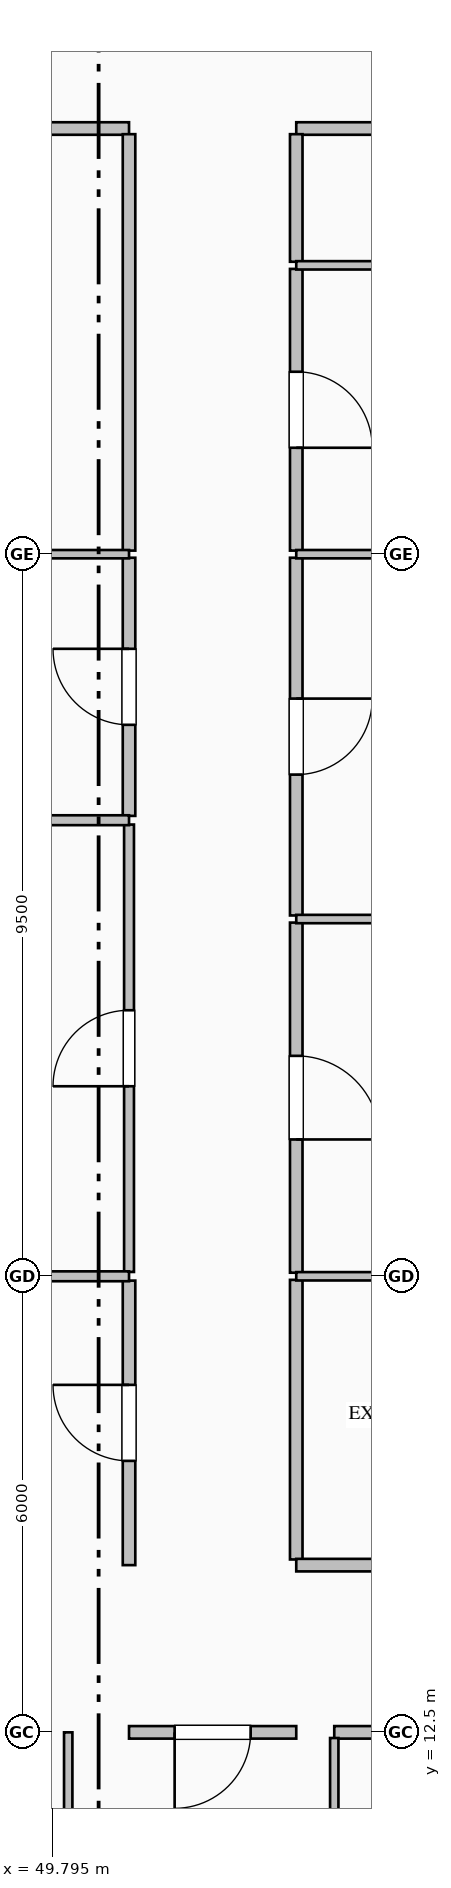
"""IFC4 building model, lengths in metres.
Left out: names, types, materials, properties, quantities, classifications, styles, units other than length and angle.
Written with IfcOpenShell. Run it as: python <this file> out.ifc"""

import sys

from ifc_helpers import new_model, si_unit, direction, frame, frame_2d, origin, place, context, subcontext, project, spatial, rectangle, extrude, element, fill, save


model = new_model("IFC4")
c1 = context("Model", 3, precision=1e-05, world=origin(), true_north=direction((0.0, 1.0)))
c2 = subcontext(c1, "Body", "Model", "MODEL_VIEW")
j1 = project(units=[si_unit("LENGTHUNIT", "METRE"), si_unit("PLANEANGLEUNIT", "RADIAN")], contexts=[c1])
p1 = place(None, origin())
s1 = spatial("IfcSite", under=j1, at=p1, CompositionType="ELEMENT")
p2 = place(p1, origin())
s2 = spatial("IfcBuilding", under=s1, at=p2, CompositionType="ELEMENT")
p3 = place(p2, frame((0.0, 0.0, 123.0)))
s3 = spatial("IfcBuildingStorey", under=s2, at=p3, CompositionType="ELEMENT", Elevation=123.0)
p4 = place(p3, frame((56.5, 33.6, 0.0), z_axis=(0.0, 0.0, 1.0), x_axis=(-1.0, 0.0, 0.0)))
e1 = element("IfcWall", 1, at=p4, inside=s3, PredefinedType="PARTITIONING", context=c2, shape_type="SweptSolid", body=[
    extrude(rectangle(XDim=3.5, YDim=0.165, at=frame_2d((1.75, 0.0))), origin(), (0.0, 0.0, 1.0), 3.765),
])
p5 = place(p4, frame((1.2, 0.0, 0.0)))
e2 = element("IfcOpeningElement", 2, at=p5, cuts=e1, PredefinedType="OPENING", context=c2, shape_type="SweptSolid", body=[
    extrude(rectangle(XDim=1.1, YDim=2.2, at=frame_2d((0.55, 1.1))), frame((0.0, 0.093, 0.0), z_axis=(0.0, -1.0, 0.0), x_axis=(1.0, 0.0, 0.0)), (0.0, 0.0, 1.0), 0.185),
])
p6 = place(p3, frame((50.8, 33.6, 0.0), z_axis=(0.0, 0.0, 1.0), x_axis=(-1.0, 0.0, 0.0)))
e3 = element("IfcWall", 3, at=p6, inside=s3, PredefinedType="PARTITIONING", context=c2, shape_type="SweptSolid", body=[
    extrude(rectangle(XDim=10.3, YDim=0.165, at=frame_2d((5.15, 0.0))), origin(), (0.0, 0.0, 1.0), 3.765),
])
p7 = place(p6, frame((4.65, 0.0, 0.0)))
e4 = element("IfcOpeningElement", 4, at=p7, cuts=e3, PredefinedType="OPENING", context=c2, shape_type="SweptSolid", body=[
    extrude(rectangle(XDim=1.0, YDim=2.15, at=frame_2d((0.5, 1.075))), frame((0.0, 0.093, 0.0), z_axis=(0.0, -1.0, 0.0), x_axis=(1.0, 0.0, 0.0)), (0.0, 0.0, 1.0), 0.185),
])
p8 = place(p3, frame((53.0, 18.453, 0.0), z_axis=(0.0, 0.0, 1.0), x_axis=(0.0, -1.0, 0.0)))
e5 = element("IfcWall", 5, at=p8, inside=s3, PredefinedType="PARTITIONING", context=c2, shape_type="SweptSolid", body=[
    extrude(rectangle(XDim=3.678, YDim=0.165, at=frame_2d((1.839, 0.0))), origin(), (0.0, 0.0, 1.0), 3.765),
])
p9 = place(p3, frame((53.0, 23.153, 0.0), z_axis=(0.0, 0.0, 1.0), x_axis=(0.0, -1.0, 0.0)))
e6 = element("IfcWall", 6, at=p9, inside=s3, PredefinedType="PARTITIONING", context=c2, shape_type="SweptSolid", body=[
    extrude(rectangle(XDim=4.606, YDim=0.165, at=frame_2d((2.303, 0.0))), origin(), (0.0, 0.0, 1.0), 3.765),
])
p10 = place(p9, frame((1.753, 0.0, 0.0)))
e7 = element("IfcOpeningElement", 7, at=p10, cuts=e6, PredefinedType="OPENING", context=c2, shape_type="SweptSolid", body=[
    extrude(rectangle(XDim=1.1, YDim=2.2, at=frame_2d((0.55, 1.1))), frame((0.0, 0.093, 0.0), z_axis=(0.0, -1.0, 0.0), x_axis=(1.0, 0.0, 0.0)), (0.0, 0.0, 1.0), 0.185),
])
p11 = place(p3, frame((53.0, 27.953, 0.0), z_axis=(0.0, 0.0, 1.0), x_axis=(0.0, -1.0, 0.0)))
e8 = element("IfcWall", 8, at=p11, inside=s3, PredefinedType="PARTITIONING", context=c2, shape_type="SweptSolid", body=[
    extrude(rectangle(XDim=4.706, YDim=0.165, at=frame_2d((2.353, 0.0))), origin(), (0.0, 0.0, 1.0), 3.765),
])
p12 = place(p11, frame((1.853, 0.0, 0.0)))
e9 = element("IfcOpeningElement", 9, at=p12, cuts=e8, PredefinedType="OPENING", context=c2, shape_type="SweptSolid", body=[
    extrude(rectangle(XDim=1.0, YDim=2.15, at=frame_2d((0.5, 1.075))), frame((0.0, 0.093, 0.0), z_axis=(0.0, -1.0, 0.0), x_axis=(1.0, 0.0, 0.0)), (0.0, 0.0, 1.0), 0.185),
])
p13 = place(p3, frame((53.0, 31.753, 0.0), z_axis=(0.0, 0.0, 1.0), x_axis=(0.0, -1.0, 0.0)))
e10 = element("IfcWall", 10, at=p13, inside=s3, PredefinedType="PARTITIONING", context=c2, shape_type="SweptSolid", body=[
    extrude(rectangle(XDim=3.706, YDim=0.165, at=frame_2d((1.853, 0.0))), origin(), (0.0, 0.0, 1.0), 3.765),
])
p14 = place(p13, frame((1.353, 0.0, 0.0)))
e11 = element("IfcOpeningElement", 11, at=p14, cuts=e10, PredefinedType="OPENING", context=c2, shape_type="SweptSolid", body=[
    extrude(rectangle(XDim=1.0, YDim=2.15, at=frame_2d((0.5, 1.075))), frame((0.0, 0.093, 0.0), z_axis=(0.0, -1.0, 0.0), x_axis=(1.0, 0.0, 0.0)), (0.0, 0.0, 1.0), 0.185),
])
p15 = place(p3, frame((53.0, 33.525, 0.0), z_axis=(0.0, 0.0, 1.0), x_axis=(0.0, -1.0, 0.0)))
e12 = element("IfcWall", 12, at=p15, inside=s3, PredefinedType="PARTITIONING", context=c2, shape_type="SweptSolid", body=[
    extrude(rectangle(XDim=1.678, YDim=0.165, at=frame_2d((0.839, 0.0))), origin(), (0.0, 0.0, 1.0), 3.765),
])
p16 = place(p3, frame((50.8, 14.7, 0.0), z_axis=(0.0, 0.0, 1.0), x_axis=(0.0, 1.0, 0.0)))
e13 = element("IfcWall", 13, at=p16, inside=s3, PredefinedType="PARTITIONING", context=c2, shape_type="SweptSolid", body=[
    extrude(rectangle(XDim=3.743, YDim=0.165, at=frame_2d((1.872, 0.0))), origin(), (0.0, 0.0, 1.0), 3.765),
])
p17 = place(p16, frame((1.372, 0.0, 0.0)))
e14 = element("IfcOpeningElement", 14, at=p17, cuts=e13, PredefinedType="OPENING", context=c2, shape_type="SweptSolid", body=[
    extrude(rectangle(XDim=1.0, YDim=2.15, at=frame_2d((0.5, 1.075))), frame((0.0, 0.093, 0.0), z_axis=(0.0, -1.0, 0.0), x_axis=(1.0, 0.0, 0.0)), (0.0, 0.0, 1.0), 0.185),
])
p18 = place(p3, frame((50.8, 18.557, 0.0), z_axis=(0.0, 0.0, 1.0), x_axis=(0.0, 1.0, 0.0)))
e15 = element("IfcWall", 15, at=p18, inside=s3, PredefinedType="PARTITIONING", context=c2, shape_type="SweptSolid", body=[
    extrude(rectangle(XDim=5.886, YDim=0.13, at=frame_2d((2.943, 0.0))), origin(), (0.0, 0.0, 1.0), 3.765),
])
p19 = place(p18, frame((2.443, 0.0, 0.0)))
e16 = element("IfcOpeningElement", 16, at=p19, cuts=e15, PredefinedType="OPENING", context=c2, shape_type="SweptSolid", body=[
    extrude(rectangle(XDim=1.0, YDim=2.15, at=frame_2d((0.5, 1.075))), frame((0.0, 0.075, 0.0), z_axis=(0.0, -1.0, 0.0), x_axis=(1.0, 0.0, 0.0)), (0.0, 0.0, 1.0), 0.15),
])
p20 = place(p3, frame((50.8, 24.557, 0.0), z_axis=(0.0, 0.0, 1.0), x_axis=(0.0, 1.0, 0.0)))
e17 = element("IfcWall", 17, at=p20, inside=s3, PredefinedType="PARTITIONING", context=c2, shape_type="SweptSolid", body=[
    extrude(rectangle(XDim=3.396, YDim=0.165, at=frame_2d((1.698, 0.0))), origin(), (0.0, 0.0, 1.0), 3.765),
])
p21 = place(p20, frame((1.198, 0.0, 0.0)))
e18 = element("IfcOpeningElement", 18, at=p21, cuts=e17, PredefinedType="OPENING", context=c2, shape_type="SweptSolid", body=[
    extrude(rectangle(XDim=1.0, YDim=2.15, at=frame_2d((0.5, 1.075))), frame((0.0, 0.093, 0.0), z_axis=(0.0, -1.0, 0.0), x_axis=(1.0, 0.0, 0.0)), (0.0, 0.0, 1.0), 0.185),
])
p22 = place(p3, frame((50.8, 28.047, 0.0), z_axis=(0.0, 0.0, 1.0), x_axis=(0.0, 1.0, 0.0)))
e19 = element("IfcWall", 19, at=p22, inside=s3, PredefinedType="PARTITIONING", context=c2, shape_type="SweptSolid", body=[
    extrude(rectangle(XDim=5.478, YDim=0.165, at=frame_2d((2.739, 0.0))), origin(), (0.0, 0.0, 1.0), 3.765),
])
p23 = place(p3, frame((53.0, 12.5, 0.0), z_axis=(0.0, 0.0, 1.0), x_axis=(-1.0, 0.0, 0.0)))
e20 = element("IfcWall", 20, at=p23, inside=s3, PredefinedType="PARTITIONING", context=c2, shape_type="SweptSolid", body=[
    extrude(rectangle(XDim=2.2, YDim=0.165, at=frame_2d((1.1, 0.0))), origin(), (0.0, 0.0, 1.0), 3.157),
])
p24 = place(p23, frame((0.6, 0.0, 0.0)))
e21 = element("IfcOpeningElement", 21, at=p24, cuts=e20, PredefinedType="OPENING", context=c2, shape_type="SweptSolid", body=[
    extrude(rectangle(XDim=1.0, YDim=2.15, at=frame_2d((0.5, 1.075))), frame((0.0, 0.093, 0.0), z_axis=(0.0, -1.0, 0.0), x_axis=(1.0, 0.0, 0.0)), (0.0, 0.0, 1.0), 0.185),
])
p25 = place(p3, frame((53.0, 14.7, 0.0), z_axis=(0.0, 0.0, 1.0), x_axis=(1.0, 0.0, 0.0)))
e22 = element("IfcWall", 22, at=p25, inside=s3, PredefinedType="PARTITIONING", context=c2, shape_type="SweptSolid", body=[
    extrude(rectangle(XDim=8.5, YDim=0.165, at=frame_2d((4.25, 0.0))), origin(), (0.0, 0.0, 1.0), 3.765),
])
p26 = place(p25, frame((3.75, 0.0, 0.0)))
e23 = element("IfcOpeningElement", 23, at=p26, cuts=e22, PredefinedType="OPENING", context=c2, shape_type="SweptSolid", body=[
    extrude(rectangle(XDim=1.0, YDim=2.15, at=frame_2d((0.5, 1.075))), frame((0.0, 0.093, 0.0), z_axis=(0.0, -1.0, 0.0), x_axis=(1.0, 0.0, 0.0)), (0.0, 0.0, 1.0), 0.185),
])
p27 = place(p3, frame((57.0, 12.5, 0.0), z_axis=(0.0, 0.0, 1.0), x_axis=(-1.0, 0.0, 0.0)))
e24 = element("IfcWall", 24, at=p27, inside=s3, PredefinedType="PARTITIONING", context=c2, shape_type="SweptSolid", body=[
    extrude(rectangle(XDim=3.5, YDim=0.165, at=frame_2d((1.75, 0.0))), origin(), (0.0, 0.0, 1.0), 3.157),
])
p28 = place(p27, frame((1.2, 0.0, 0.0)))
e25 = element("IfcOpeningElement", 25, at=p28, cuts=e24, PredefinedType="OPENING", context=c2, shape_type="SweptSolid", body=[
    extrude(rectangle(XDim=1.1, YDim=2.2, at=frame_2d((0.55, 1.1))), frame((0.0, 0.093, 0.0), z_axis=(0.0, -1.0, 0.0), x_axis=(1.0, 0.0, 0.0)), (0.0, 0.0, 1.0), 0.185),
])
p29 = place(p3, frame((53.0, 18.5, 0.0), z_axis=(0.0, 0.0, 1.0), x_axis=(1.0, 0.0, 0.0)))
e26 = element("IfcWall", 26, at=p29, inside=s3, PredefinedType="MOVABLE", context=c2, shape_type="SweptSolid", body=[
    extrude(rectangle(XDim=10.728, YDim=0.11, at=frame_2d((5.364, 0.0))), origin(), (0.0, 0.0, 1.0), 3.157),
])
p30 = place(p3, frame((53.0, 23.2, 0.0), z_axis=(0.0, 0.0, 1.0), x_axis=(1.0, 0.0, 0.0)))
e27 = element("IfcWall", 27, at=p30, inside=s3, PredefinedType="MOVABLE", context=c2, shape_type="SweptSolid", body=[
    extrude(rectangle(XDim=10.728, YDim=0.11, at=frame_2d((5.364, 0.0))), origin(), (0.0, 0.0, 1.0), 3.407),
])
p31 = place(p3, frame((53.0, 28.0, 0.0), z_axis=(0.0, 0.0, 1.0), x_axis=(1.0, 0.0, 0.0)))
e28 = element("IfcWall", 28, at=p31, inside=s3, PredefinedType="MOVABLE", context=c2, shape_type="SweptSolid", body=[
    extrude(rectangle(XDim=10.728, YDim=0.11, at=frame_2d((5.364, 0.0))), origin(), (0.0, 0.0, 1.0), 3.157),
])
p32 = place(p3, frame((53.0, 31.8, 0.0), z_axis=(0.0, 0.0, 1.0), x_axis=(1.0, 0.0, 0.0)))
e29 = element("IfcWall", 29, at=p32, inside=s3, PredefinedType="MOVABLE", context=c2, shape_type="SweptSolid", body=[
    extrude(rectangle(XDim=10.728, YDim=0.11, at=frame_2d((5.364, 0.0))), origin(), (0.0, 0.0, 1.0), 3.765),
])
p33 = place(p3, frame((40.832, 18.5, 0.0), z_axis=(0.0, 0.0, 1.0), x_axis=(1.0, 0.0, 0.0)))
e30 = element("IfcWall", 30, at=p33, inside=s3, PredefinedType="PARTITIONING", context=c2, shape_type="SweptSolid", body=[
    extrude(rectangle(XDim=9.968, YDim=0.13, at=frame_2d((4.984, 0.0))), origin(), (0.0, 0.0, 1.0), 3.157),
])
p34 = place(p3, frame((40.832, 24.5, 0.0), z_axis=(0.0, 0.0, 1.0), x_axis=(1.0, 0.0, 0.0)))
e31 = element("IfcWall", 31, at=p34, inside=s3, PredefinedType="PARTITIONING", context=c2, shape_type="SweptSolid", body=[
    extrude(rectangle(XDim=9.968, YDim=0.13, at=frame_2d((4.984, 0.0))), origin(), (0.0, 0.0, 1.0), 3.765),
])
p35 = place(p3, frame((40.832, 28.0, 0.0), z_axis=(0.0, 0.0, 1.0), x_axis=(1.0, 0.0, 0.0)))
e32 = element("IfcWall", 32, at=p35, inside=s3, PredefinedType="MOVABLE", context=c2, shape_type="SweptSolid", body=[
    extrude(rectangle(XDim=9.968, YDim=0.11, at=frame_2d((4.984, 0.0))), origin(), (0.0, 0.0, 1.0), 3.157),
])
p36 = place(p3, frame((50.0, 12.5, 0.0), z_axis=(0.0, 0.0, 1.0), x_axis=(0.0, -1.0, 0.0)))
e33 = element("IfcWall", 33, at=p36, inside=s3, PredefinedType="MOVABLE", context=c2, shape_type="SweptSolid", body=[
    extrude(rectangle(XDim=8.168, YDim=0.11, at=frame_2d((4.084, 0.0))), origin(), (0.0, 0.0, 1.0), 3.765),
])
p37 = place(p36, frame((3.534, 0.0, 0.0)))
e34 = element("IfcOpeningElement", 34, at=p37, cuts=e33, PredefinedType="OPENING", context=c2, shape_type="SweptSolid", body=[
    extrude(rectangle(XDim=1.1, YDim=2.2, at=frame_2d((0.55, 1.1))), frame((0.0, 0.065, 0.0), z_axis=(0.0, -1.0, 0.0), x_axis=(1.0, 0.0, 0.0)), (0.0, 0.0, 1.0), 0.13),
])
p38 = place(p3, frame((53.5, 12.426, 0.0), z_axis=(0.0, 0.0, 1.0), x_axis=(0.0, -1.0, 0.0)))
e35 = element("IfcWall", 35, at=p38, inside=s3, PredefinedType="MOVABLE", context=c2, shape_type="SweptSolid", body=[
    extrude(rectangle(XDim=8.094, YDim=0.11, at=frame_2d((4.047, 0.0))), origin(), (0.0, 0.0, 1.0), 3.765),
])
p39 = place(p10, origin())
e36 = element("IfcDoor", 36, at=p39, inside=s3, OperationType="SINGLE_SWING_RIGHT", PredefinedType="DOOR", context=c2, shape_type="SweptSolid", body=[
    extrude(rectangle(XDim=1.1, YDim=2.2, at=frame_2d((0.55, 1.1))), frame((0.0, 0.025, 0.0), z_axis=(0.0, -1.0, 0.0), x_axis=(1.0, 0.0, 0.0)), (0.0, 0.0, 1.0), 0.05),
])
fill(e7, e36)
p40 = place(p12, origin())
e37 = element("IfcDoor", 37, at=p40, inside=s3, OperationType="SINGLE_SWING_LEFT", PredefinedType="DOOR", context=c2, shape_type="SweptSolid", body=[
    extrude(rectangle(XDim=1.0, YDim=2.15, at=frame_2d((0.5, 1.075))), frame((0.0, 0.025, 0.0), z_axis=(0.0, -1.0, 0.0), x_axis=(1.0, 0.0, 0.0)), (0.0, 0.0, 1.0), 0.05),
])
fill(e9, e37)
p41 = place(p14, origin())
e38 = element("IfcDoor", 38, at=p41, inside=s3, OperationType="SINGLE_SWING_RIGHT", PredefinedType="DOOR", context=c2, shape_type="SweptSolid", body=[
    extrude(rectangle(XDim=1.0, YDim=2.15, at=frame_2d((0.5, 1.075))), frame((0.0, 0.025, 0.0), z_axis=(0.0, -1.0, 0.0), x_axis=(1.0, 0.0, 0.0)), (0.0, 0.0, 1.0), 0.05),
])
fill(e11, e38)
p42 = place(p17, origin())
e39 = element("IfcDoor", 39, at=p42, inside=s3, OperationType="SINGLE_SWING_RIGHT", PredefinedType="DOOR", context=c2, shape_type="SweptSolid", body=[
    extrude(rectangle(XDim=1.0, YDim=2.15, at=frame_2d((0.5, 1.075))), frame((0.0, 0.025, 0.0), z_axis=(0.0, -1.0, 0.0), x_axis=(1.0, 0.0, 0.0)), (0.0, 0.0, 1.0), 0.05),
])
fill(e14, e39)
p43 = place(p19, origin())
e40 = element("IfcDoor", 40, at=p43, inside=s3, OperationType="SINGLE_SWING_LEFT", PredefinedType="DOOR", context=c2, shape_type="SweptSolid", body=[
    extrude(rectangle(XDim=1.0, YDim=2.15, at=frame_2d((0.5, 1.075))), frame((0.0, 0.025, 0.0), z_axis=(0.0, -1.0, 0.0), x_axis=(1.0, 0.0, 0.0)), (0.0, 0.0, 1.0), 0.05),
])
fill(e16, e40)
p44 = place(p21, origin())
e41 = element("IfcDoor", 41, at=p44, inside=s3, OperationType="SINGLE_SWING_RIGHT", PredefinedType="DOOR", context=c2, shape_type="SweptSolid", body=[
    extrude(rectangle(XDim=1.0, YDim=2.15, at=frame_2d((0.5, 1.075))), frame((0.0, 0.025, 0.0), z_axis=(0.0, -1.0, 0.0), x_axis=(1.0, 0.0, 0.0)), (0.0, 0.0, 1.0), 0.05),
])
fill(e18, e41)
p45 = place(p24, origin())
e42 = element("IfcDoor", 42, at=p45, inside=s3, OperationType="SINGLE_SWING_RIGHT", PredefinedType="DOOR", context=c2, shape_type="SweptSolid", body=[
    extrude(rectangle(XDim=1.0, YDim=2.15, at=frame_2d((0.5, 1.075))), frame((0.0, 0.025, 0.0), z_axis=(0.0, -1.0, 0.0), x_axis=(1.0, 0.0, 0.0)), (0.0, 0.0, 1.0), 0.05),
])
fill(e21, e42)
save(model, sys.argv[1])
